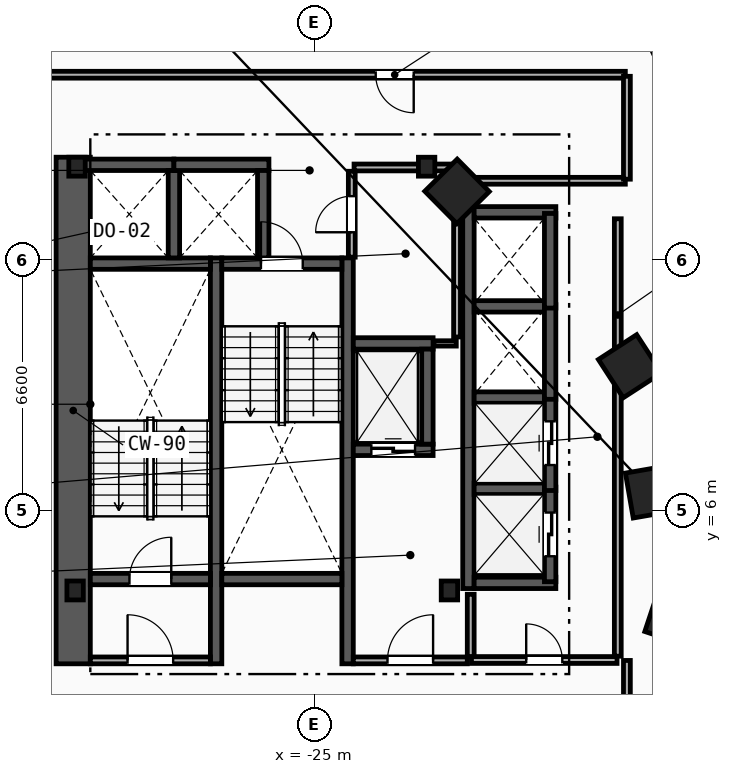
"""IFC4 building model, lengths in metres.
Left out: names, types, materials, properties, quantities, classifications, styles, units other than length and angle.
Written with IfcOpenShell. Run it as: python <this file> out.ifc"""

import sys

from ifc_helpers import new_model, si_unit, direction, frame, frame_2d, origin, origin_2d, place, context, subcontext, project, spatial, rectangle, i_section, extrude, element, fill, save


model = new_model("IFC4")
c1 = context("Model", 3, precision=1e-05, world=origin(), true_north=direction((0.0, 1.0)))
c2 = subcontext(c1, "Body", "Model", "MODEL_VIEW")
j1 = project(units=[si_unit("LENGTHUNIT", "METRE"), si_unit("PLANEANGLEUNIT", "RADIAN")], contexts=[c1])
p1 = place(None, origin())
s1 = spatial("IfcSite", under=j1, at=p1, CompositionType="ELEMENT")
p2 = place(p1, origin())
s2 = spatial("IfcBuilding", under=s1, at=p2, CompositionType="ELEMENT")
p3 = place(p2, frame((0.0, 0.0, 27.8)))
s3 = spatial("IfcBuildingStorey", under=s2, at=p3, CompositionType="ELEMENT", Elevation=27.8)
for number, where, z_axis, x_axis in (
    (1, (-31.3, 3.9, 0.0), (0.0, 0.0, 1.0), (1.0, 0.0, 0.0)),
    (2, (-21.45, 3.9, 0.0), (0.0, 0.0, 1.0), (1.0, 0.0, 0.0)),
    (3, (-22.05, 15.05, 0.0), (0.0, 0.0, 1.0), (1.0, 0.0, 0.0)),
    (4, (-31.25, 15.05, 0.0), (0.0, 0.0, 1.0), (1.0, 0.0, 0.0)),
):
    element("IfcColumn", number, at=place(p3, frame(where, z_axis=z_axis, x_axis=x_axis)), inside=s3, PredefinedType="COLUMN", context=c2, shape_type="SweptSolid", body=[
        extrude(i_section(OverallWidth=0.432, OverallDepth=0.498, WebThickness=0.056, FlangeThickness=0.089, FilletRadius=0.018, at=origin_2d()), origin(), (0.0, 0.0, 1.0), 3.8),
    ])
for number, where, z_axis, x_axis in (
    (5, (-15.55, 3.2, 0.0), (0.0, 0.0, 1.0), (0.315, 0.949, 0.0)),
    (6, (-16.125, 6.5, 0.0), (0.0, 0.0, 1.0), (-0.172, 0.985, 0.0)),
    (7, (-16.7, 9.8, 0.0), (0.0, 0.0, 1.0), (-0.544, 0.839, 0.0)),
    (8, (-21.25, 14.4, 0.0), (0.0, 0.0, 1.0), (-0.703, 0.711, 0.0)),
):
    element("IfcColumn", number, at=place(p3, frame(where, z_axis=z_axis, x_axis=x_axis)), inside=s3, PredefinedType="COLUMN", context=c2, shape_type="SweptSolid", body=[
        extrude(rectangle(XDim=1.2, YDim=1.2, at=origin_2d()), origin(), (0.0, 0.0, 1.0), 3.8),
    ])
p4 = place(p3, frame((-31.35, 1.97, 0.0), z_axis=(0.0, 0.0, 1.0), x_axis=(0.0, 1.0, 0.0)))
e9 = element("IfcWall", 9, at=p4, inside=s3, PredefinedType="SHEAR", context=c2, shape_type="SweptSolid", body=[
    extrude(rectangle(XDim=13.33, YDim=0.9, at=frame_2d((6.665, 0.0))), origin(), (0.0, 0.0, 1.0), 3.5),
])
for number, where, z_axis, x_axis in (
    (10, (-27.59, 1.97, 0.0), (0.0, 0.0, 1.0), (0.0, 1.0, 0.0)),
    (11, (-24.13, 1.97, 0.0), (0.0, 0.0, 1.0), (0.0, 1.0, 0.0)),
):
    element("IfcWall", number, at=place(p3, frame(where, z_axis=z_axis, x_axis=x_axis)), inside=s3, PredefinedType="SHEAR", context=c2, shape_type="SweptSolid", body=[
        extrude(rectangle(XDim=10.68, YDim=0.3, at=frame_2d((5.34, 0.0))), origin(), (0.0, 0.0, 1.0), 3.5),
    ])
p5 = place(p3, frame((-30.9, 4.2, 0.0), z_axis=(0.0, 0.0, 1.0), x_axis=(1.0, 0.0, 0.0)))
e12 = element("IfcWall", 12, at=p5, inside=s3, PredefinedType="SHEAR", context=c2, shape_type="SweptSolid", body=[
    extrude(rectangle(XDim=3.16, YDim=0.3, at=frame_2d((1.58, 0.0))), origin(), (0.0, 0.0, 1.0), 3.5),
])
p6 = place(p5, frame((1.03, 0.0, 0.0)))
e13 = element("IfcOpeningElement", 13, at=p6, cuts=e12, PredefinedType="OPENING", context=c2, shape_type="SweptSolid", body=[
    extrude(rectangle(XDim=1.1, YDim=2.15, at=frame_2d((0.55, 1.075))), frame((0.0, 0.16, 0.0), z_axis=(0.0, -1.0, 0.0), x_axis=(1.0, 0.0, 0.0)), (0.0, 0.0, 1.0), 0.32),
])
p7 = place(p3, frame((-30.9, 12.5, 0.0), z_axis=(0.0, 0.0, 1.0), x_axis=(1.0, 0.0, 0.0)))
e14 = element("IfcWall", 14, at=p7, inside=s3, PredefinedType="SHEAR", context=c2, shape_type="SweptSolid", body=[
    extrude(rectangle(XDim=3.16, YDim=0.3, at=frame_2d((1.58, 0.0))), origin(), (0.0, 0.0, 1.0), 3.5),
])
p8 = place(p3, frame((-27.44, 12.5, 0.0), z_axis=(0.0, 0.0, 1.0), x_axis=(1.0, 0.0, 0.0)))
e15 = element("IfcWall", 15, at=p8, inside=s3, PredefinedType="SHEAR", context=c2, shape_type="SweptSolid", body=[
    extrude(rectangle(XDim=3.16, YDim=0.3, at=frame_2d((1.58, 0.0))), origin(), (0.0, 0.0, 1.0), 3.5),
])
p9 = place(p8, frame((1.03, 0.0, 0.0)))
e16 = element("IfcOpeningElement", 16, at=p9, cuts=e15, PredefinedType="OPENING", context=c2, shape_type="SweptSolid", body=[
    extrude(rectangle(XDim=1.1, YDim=2.15, at=frame_2d((0.55, 1.075))), frame((0.0, 0.16, 0.0), z_axis=(0.0, -1.0, 0.0), x_axis=(1.0, 0.0, 0.0)), (0.0, 0.0, 1.0), 0.32),
])
p10 = place(p3, frame((-27.44, 4.2, 0.0), z_axis=(0.0, 0.0, 1.0), x_axis=(1.0, 0.0, 0.0)))
e17 = element("IfcWall", 17, at=p10, inside=s3, PredefinedType="SHEAR", context=c2, shape_type="SweptSolid", body=[
    extrude(rectangle(XDim=3.16, YDim=0.3, at=frame_2d((1.58, 0.0))), origin(), (0.0, 0.0, 1.0), 3.5),
])
p11 = place(p3, frame((-20.89, 2.15, 0.0), z_axis=(0.0, 0.0, 1.0), x_axis=(0.0, 1.0, 0.0)))
e18 = element("IfcWall", 18, at=p11, inside=s3, PredefinedType="PARTITIONING", context=c2, shape_type="SweptSolid", body=[
    extrude(rectangle(XDim=1.65, YDim=0.18, at=frame_2d((0.825, 0.0))), origin(), (0.0, 0.0, 1.0), 3.5),
])
p12 = place(p3, frame((-23.98, 2.06, 0.0), z_axis=(0.0, 0.0, 1.0), x_axis=(1.0, 0.0, 0.0)))
e19 = element("IfcWall", 19, at=p12, inside=s3, PredefinedType="PARTITIONING", context=c2, shape_type="SweptSolid", body=[
    extrude(rectangle(XDim=3.0, YDim=0.18, at=frame_2d((1.5, 0.0))), origin(), (0.0, 0.0, 1.0), 3.5),
])
p13 = place(p12, frame((0.9, 0.0, 0.0)))
e20 = element("IfcOpeningElement", 20, at=p13, cuts=e19, PredefinedType="OPENING", context=c2, shape_type="SweptSolid", body=[
    extrude(rectangle(XDim=1.2, YDim=2.15, at=frame_2d((0.6, 1.075))), frame((0.0, 0.1, 0.0), z_axis=(0.0, -1.0, 0.0), x_axis=(1.0, 0.0, 0.0)), (0.0, 0.0, 1.0), 0.2),
])
p14 = place(p3, frame((-30.9, 2.06, 0.0), z_axis=(0.0, 0.0, 1.0), x_axis=(1.0, 0.0, 0.0)))
e21 = element("IfcWall", 21, at=p14, inside=s3, PredefinedType="PARTITIONING", context=c2, shape_type="SweptSolid", body=[
    extrude(rectangle(XDim=3.16, YDim=0.18, at=frame_2d((1.58, 0.0))), origin(), (0.0, 0.0, 1.0), 3.5),
])
p15 = place(p14, frame((0.98, 0.0, 0.0)))
e22 = element("IfcOpeningElement", 22, at=p15, cuts=e21, PredefinedType="OPENING", context=c2, shape_type="SweptSolid", body=[
    extrude(rectangle(XDim=1.2, YDim=2.15, at=frame_2d((0.6, 1.075))), frame((0.0, 0.1, 0.0), z_axis=(0.0, -1.0, 0.0), x_axis=(1.0, 0.0, 0.0)), (0.0, 0.0, 1.0), 0.2),
])
p16 = place(p3, frame((-23.98, 7.6, 0.0), z_axis=(0.0, 0.0, 1.0), x_axis=(1.0, 0.0, 0.0)))
e23 = element("IfcWall", 23, at=p16, inside=s3, PredefinedType="SHEAR", context=c2, shape_type="SweptSolid", body=[
    extrude(rectangle(XDim=2.1, YDim=0.3, at=frame_2d((1.05, 0.0))), origin(), (0.0, 0.0, 1.0), 3.5),
])
p17 = place(p16, frame((0.475, 0.0, 0.0)))
e24 = element("IfcOpeningElement", 24, at=p17, cuts=e23, PredefinedType="OPENING", context=c2, shape_type="SweptSolid", body=[
    extrude(rectangle(XDim=1.15, YDim=2.2, at=frame_2d((0.575, 1.1))), frame((0.0, 0.16, 0.0), z_axis=(0.0, -1.0, 0.0), x_axis=(1.0, 0.0, 0.0)), (0.0, 0.0, 1.0), 0.32),
])
p18 = place(p3, frame((-23.98, 10.4, 0.0), z_axis=(0.0, 0.0, 1.0), x_axis=(1.0, 0.0, 0.0)))
e25 = element("IfcWall", 25, at=p18, inside=s3, PredefinedType="SHEAR", context=c2, shape_type="SweptSolid", body=[
    extrude(rectangle(XDim=2.1, YDim=0.3, at=frame_2d((1.05, 0.0))), origin(), (0.0, 0.0, 1.0), 3.5),
])
for number, where, z_axis, x_axis in (
    (26, (-22.03, 7.75, 0.0), (0.0, 0.0, 1.0), (0.0, 1.0, 0.0)),
    (27, (-31.2, 15.1, 0.0), (0.0, 0.0, 1.0), (1.0, 0.0, 0.0)),
):
    element("IfcWall", number, at=place(p3, frame(where, z_axis=z_axis, x_axis=x_axis)), inside=s3, PredefinedType="SHEAR", context=c2, shape_type="SweptSolid", body=[
        extrude(rectangle(XDim=2.5, YDim=0.3, at=frame_2d((1.25, 0.0))), origin(), (0.0, 0.0, 1.0), 3.5),
    ])
p19 = place(p3, frame((-28.7, 12.65, 0.0), z_axis=(0.0, 0.0, 1.0), x_axis=(0.0, 1.0, 0.0)))
e28 = element("IfcWall", 28, at=p19, inside=s3, PredefinedType="SHEAR", context=c2, shape_type="SweptSolid", body=[
    extrude(rectangle(XDim=2.3, YDim=0.3, at=frame_2d((1.15, 0.0))), origin(), (0.0, 0.0, 1.0), 3.5),
])
p20 = place(p3, frame((-28.7, 15.1, 0.0), z_axis=(0.0, 0.0, 1.0), x_axis=(1.0, 0.0, 0.0)))
e29 = element("IfcWall", 29, at=p20, inside=s3, PredefinedType="SHEAR", context=c2, shape_type="SweptSolid", body=[
    extrude(rectangle(XDim=2.5, YDim=0.3, at=frame_2d((1.25, 0.0))), origin(), (0.0, 0.0, 1.0), 3.5),
])
p21 = place(p3, frame((-26.35, 12.65, 0.0), z_axis=(0.0, 0.0, 1.0), x_axis=(0.0, 1.0, 0.0)))
e30 = element("IfcWall", 30, at=p21, inside=s3, PredefinedType="SHEAR", context=c2, shape_type="SweptSolid", body=[
    extrude(rectangle(XDim=2.3, YDim=0.3, at=frame_2d((1.15, 0.0))), origin(), (0.0, 0.0, 1.0), 3.5),
])
p22 = place(p3, frame((-20.95, 3.95, 0.0), z_axis=(0.0, 0.0, 1.0), x_axis=(0.0, 1.0, 0.0)))
e31 = element("IfcWall", 31, at=p22, inside=s3, PredefinedType="SHEAR", context=c2, shape_type="SweptSolid", body=[
    extrude(rectangle(XDim=10.05, YDim=0.3, at=frame_2d((5.025, 0.0))), origin(), (0.0, 0.0, 1.0), 3.5),
])
for number, where, z_axis, x_axis in (
    (32, (-20.8, 4.1, 0.0), (0.0, 0.0, 1.0), (1.0, 0.0, 0.0)),
    (33, (-20.8, 13.85, 0.0), (0.0, 0.0, 1.0), (1.0, 0.0, 0.0)),
):
    element("IfcWall", number, at=place(p3, frame(where, z_axis=z_axis, x_axis=x_axis)), inside=s3, PredefinedType="SHEAR", context=c2, shape_type="SweptSolid", body=[
        extrude(rectangle(XDim=2.15, YDim=0.3, at=frame_2d((1.075, 0.0))), origin(), (0.0, 0.0, 1.0), 3.5),
    ])
for number, where, z_axis, x_axis in (
    (34, (-20.8, 6.575, 0.0), (0.0, 0.0, 1.0), (1.0, 0.0, 0.0)),
    (35, (-20.8, 8.975, 0.0), (0.0, 0.0, 1.0), (1.0, 0.0, 0.0)),
    (36, (-20.8, 11.375, 0.0), (0.0, 0.0, 1.0), (1.0, 0.0, 0.0)),
):
    element("IfcWall", number, at=place(p3, frame(where, z_axis=z_axis, x_axis=x_axis)), inside=s3, PredefinedType="SHEAR", context=c2, shape_type="SweptSolid", body=[
        extrude(rectangle(XDim=1.85, YDim=0.3, at=frame_2d((0.925, 0.0))), origin(), (0.0, 0.0, 1.0), 3.5),
    ])
p23 = place(p3, frame((-18.8, 4.13, 0.0), z_axis=(0.0, 0.0, 1.0), x_axis=(0.0, 1.0, 0.0)))
e37 = element("IfcWall", 37, at=p23, inside=s3, PredefinedType="SHEAR", context=c2, shape_type="SweptSolid", body=[
    extrude(rectangle(XDim=2.49, YDim=0.3, at=frame_2d((1.245, 0.0))), origin(), (0.0, 0.0, 1.0), 3.5),
])
p24 = place(p23, frame((0.67, 0.0, 0.0)))
e38 = element("IfcOpeningElement", 38, at=p24, cuts=e37, PredefinedType="OPENING", context=c2, shape_type="SweptSolid", body=[
    extrude(rectangle(XDim=1.15, YDim=2.2, at=frame_2d((0.575, 1.1))), frame((0.0, 0.16, 0.0), z_axis=(0.0, -1.0, 0.0), x_axis=(1.0, 0.0, 0.0)), (0.0, 0.0, 1.0), 0.32),
])
p25 = place(p3, frame((-18.8, 6.53, 0.0), z_axis=(0.0, 0.0, 1.0), x_axis=(0.0, 1.0, 0.0)))
e39 = element("IfcWall", 39, at=p25, inside=s3, PredefinedType="SHEAR", context=c2, shape_type="SweptSolid", body=[
    extrude(rectangle(XDim=2.49, YDim=0.3, at=frame_2d((1.245, 0.0))), origin(), (0.0, 0.0, 1.0), 3.5),
])
p26 = place(p25, frame((0.67, 0.0, 0.0)))
e40 = element("IfcOpeningElement", 40, at=p26, cuts=e39, PredefinedType="OPENING", context=c2, shape_type="SweptSolid", body=[
    extrude(rectangle(XDim=1.15, YDim=2.2, at=frame_2d((0.575, 1.1))), frame((0.0, 0.16, 0.0), z_axis=(0.0, -1.0, 0.0), x_axis=(1.0, 0.0, 0.0)), (0.0, 0.0, 1.0), 0.32),
])
for number, where, z_axis, x_axis in (
    (41, (-18.8, 8.93, 0.0), (0.0, 0.0, 1.0), (0.0, 1.0, 0.0)),
    (42, (-18.8, 11.33, 0.0), (0.0, 0.0, 1.0), (0.0, 1.0, 0.0)),
):
    element("IfcWall", number, at=place(p3, frame(where, z_axis=z_axis, x_axis=x_axis)), inside=s3, PredefinedType="SHEAR", context=c2, shape_type="SweptSolid", body=[
        extrude(rectangle(XDim=2.49, YDim=0.3, at=frame_2d((1.245, 0.0))), origin(), (0.0, 0.0, 1.0), 3.5),
    ])
p27 = place(p3, frame((-17.02, 2.17, 0.0), z_axis=(0.0, 0.0, 1.0), x_axis=(0.0, 1.0, 0.0)))
e43 = element("IfcWall", 43, at=p27, inside=s3, PredefinedType="PARTITIONING", context=c2, shape_type="SweptSolid", body=[
    extrude(rectangle(XDim=11.51, YDim=0.18, at=frame_2d((5.755, 0.0))), origin(), (0.0, 0.0, 1.0), 3.5),
])
p28 = place(p3, frame((-20.87, 2.07, 0.0), z_axis=(0.0, 0.0, 1.0), x_axis=(1.0, 0.0, 0.0)))
e44 = element("IfcWall", 44, at=p28, inside=s3, PredefinedType="PARTITIONING", context=c2, shape_type="SweptSolid", body=[
    extrude(rectangle(XDim=3.83, YDim=0.18, at=frame_2d((1.915, 0.0))), origin(), (0.0, 0.0, 1.0), 3.5),
])
p29 = place(p28, frame((1.44, 0.0, 0.0)))
e45 = element("IfcOpeningElement", 45, at=p29, cuts=e44, PredefinedType="OPENING", context=c2, shape_type="SweptSolid", body=[
    extrude(rectangle(XDim=0.95, YDim=2.1, at=frame_2d((0.475, 1.05))), frame((0.0, 0.1, 0.0), z_axis=(0.0, -1.0, 0.0), x_axis=(1.0, 0.0, 0.0)), (0.0, 0.0, 1.0), 0.2),
])
p30 = place(p3, frame((-21.86, 10.4, 0.0), z_axis=(0.0, 0.0, 1.0), x_axis=(1.0, 0.0, 0.0)))
e46 = element("IfcWall", 46, at=p30, inside=s3, PredefinedType="PARTITIONING", context=c2, shape_type="SweptSolid", body=[
    extrude(rectangle(XDim=0.59, YDim=0.14, at=frame_2d((0.295, 0.0))), origin(), (0.0, 0.0, 1.0), 3.5),
])
p31 = place(p3, frame((-21.25, 10.57, 0.0), z_axis=(0.0, 0.0, 1.0), x_axis=(0.0, 1.0, 0.0)))
e47 = element("IfcWall", 47, at=p31, inside=s3, PredefinedType="PARTITIONING", context=c2, shape_type="SweptSolid", body=[
    extrude(rectangle(XDim=4.36, YDim=0.18, at=frame_2d((2.18, 0.0))), origin(), (0.0, 0.0, 1.0), 3.5),
])
p32 = place(p3, frame((-23.96, 15.03, 0.0), z_axis=(0.0, 0.0, 1.0), x_axis=(1.0, 0.0, 0.0)))
e48 = element("IfcWall", 48, at=p32, inside=s3, PredefinedType="PARTITIONING", context=c2, shape_type="SweptSolid", body=[
    extrude(rectangle(XDim=2.61, YDim=0.18, at=frame_2d((1.305, 0.0))), origin(), (0.0, 0.0, 1.0), 2.573),
])
p33 = place(p3, frame((-24.02, 12.67, 0.0), z_axis=(0.0, 0.0, 1.0), x_axis=(0.0, 1.0, 0.0)))
e49 = element("IfcWall", 49, at=p33, inside=s3, PredefinedType="PARTITIONING", context=c2, shape_type="SweptSolid", body=[
    extrude(rectangle(XDim=2.26, YDim=0.18, at=frame_2d((1.13, 0.0))), origin(), (0.0, 0.0, 1.0), 3.5),
])
p34 = place(p33, frame((0.655, 0.0, 0.0)))
e50 = element("IfcOpeningElement", 50, at=p34, cuts=e49, PredefinedType="OPENING", context=c2, shape_type="SweptSolid", body=[
    extrude(rectangle(XDim=0.95, YDim=2.1, at=frame_2d((0.475, 1.05))), frame((0.0, 0.1, 0.0), z_axis=(0.0, -1.0, 0.0), x_axis=(1.0, 0.0, 0.0)), (0.0, 0.0, 1.0), 0.2),
])
p35 = place(p3, frame((-16.822, 17.47, 0.0), z_axis=(0.0, 0.0, 1.0), x_axis=(-1.0, 0.0, 0.0)))
e51 = element("IfcWall", 51, at=p35, inside=s3, PredefinedType="PARTITIONING", context=c2, shape_type="SweptSolid", body=[
    extrude(rectangle(XDim=16.807, YDim=0.18, at=frame_2d((8.403, 0.0))), origin(), (0.0, 0.0, 1.0), 3.5),
])
p36 = place(p35, frame((5.569, 0.0, 0.0)))
e52 = element("IfcOpeningElement", 52, at=p36, cuts=e51, PredefinedType="OPENING", context=c2, shape_type="SweptSolid", body=[
    extrude(rectangle(XDim=1.0, YDim=2.15, at=frame_2d((0.5, 1.075))), frame((0.0, 0.1, 0.0), z_axis=(0.0, -1.0, 0.0), x_axis=(1.0, 0.0, 0.0)), (0.0, 0.0, 1.0), 0.2),
])
p37 = place(p3, frame((-21.178, 14.68, 0.0), z_axis=(0.0, 0.0, 1.0), x_axis=(1.0, 0.0, 0.0)))
e53 = element("IfcWall", 53, at=p37, inside=s3, PredefinedType="PARTITIONING", context=c2, shape_type="SweptSolid", body=[
    extrude(rectangle(XDim=4.357, YDim=0.18, at=frame_2d((2.178, 0.0))), origin(), (0.0, 0.0, 1.0), 3.5),
])
p38 = place(p3, frame((-16.78, 14.721, 0.0), z_axis=(0.0, 0.0, 1.0), x_axis=(0.0, 1.0, 0.0)))
e54 = element("IfcWall", 54, at=p38, inside=s3, PredefinedType="PARTITIONING", context=c2, shape_type="SweptSolid", body=[
    extrude(rectangle(XDim=2.707, YDim=0.18, at=frame_2d((1.354, 0.0))), origin(), (0.0, 0.0, 1.0), 3.5),
])
p39 = place(p3, frame((-16.78, -0.329, 0.0), z_axis=(0.0, 0.0, 1.0), x_axis=(0.0, 1.0, 0.0)))
e55 = element("IfcWall", 55, at=p39, inside=s3, PredefinedType="PARTITIONING", context=c2, shape_type="SweptSolid", body=[
    extrude(rectangle(XDim=2.387, YDim=0.18, at=frame_2d((1.194, 0.0))), origin(), (0.0, 0.0, 1.0), 3.5),
])
p40 = place(p6, origin())
e56 = element("IfcDoor", 56, at=p40, inside=s3, OperationType="SINGLE_SWING_RIGHT", PredefinedType="DOOR", context=c2, shape_type="SweptSolid", body=[
    extrude(rectangle(XDim=1.1, YDim=2.15, at=frame_2d((0.55, 1.075))), frame((0.0, 0.025, 0.0), z_axis=(0.0, -1.0, 0.0), x_axis=(1.0, 0.0, 0.0)), (0.0, 0.0, 1.0), 0.05),
])
fill(e13, e56)
p41 = place(p9, origin())
e57 = element("IfcDoor", 57, at=p41, inside=s3, OperationType="SINGLE_SWING_LEFT", PredefinedType="DOOR", context=c2, shape_type="SweptSolid", body=[
    extrude(rectangle(XDim=1.1, YDim=2.15, at=frame_2d((0.55, 1.075))), frame((0.0, 0.025, 0.0), z_axis=(0.0, -1.0, 0.0), x_axis=(1.0, 0.0, 0.0)), (0.0, 0.0, 1.0), 0.05),
])
fill(e16, e57)
p42 = place(p13, origin())
e58 = element("IfcDoor", 58, at=p42, inside=s3, OperationType="SINGLE_SWING_RIGHT", PredefinedType="DOOR", context=c2, shape_type="SweptSolid", body=[
    extrude(rectangle(XDim=1.2, YDim=2.15, at=frame_2d((0.6, 1.075))), frame((0.0, 0.025, 0.0), z_axis=(0.0, -1.0, 0.0), x_axis=(1.0, 0.0, 0.0)), (0.0, 0.0, 1.0), 0.05),
])
fill(e20, e58)
p43 = place(p15, origin())
e59 = element("IfcDoor", 59, at=p43, inside=s3, OperationType="SINGLE_SWING_LEFT", PredefinedType="DOOR", context=c2, shape_type="SweptSolid", body=[
    extrude(rectangle(XDim=1.2, YDim=2.15, at=frame_2d((0.6, 1.075))), frame((0.0, 0.025, 0.0), z_axis=(0.0, -1.0, 0.0), x_axis=(1.0, 0.0, 0.0)), (0.0, 0.0, 1.0), 0.05),
])
fill(e22, e59)
p44 = place(p17, origin())
e60 = element("IfcDoor", 60, at=p44, inside=s3, OperationType="SLIDING_TO_LEFT", PredefinedType="TRAPDOOR", context=c2, shape_type="SweptSolid", body=[
    extrude(rectangle(XDim=1.15, YDim=2.2, at=frame_2d((0.575, 1.1))), frame((0.0, 0.025, 0.0), z_axis=(0.0, -1.0, 0.0), x_axis=(1.0, 0.0, 0.0)), (0.0, 0.0, 1.0), 0.05),
])
fill(e24, e60)
p45 = place(p24, origin())
e61 = element("IfcDoor", 61, at=p45, inside=s3, OperationType="SLIDING_TO_LEFT", PredefinedType="TRAPDOOR", context=c2, shape_type="SweptSolid", body=[
    extrude(rectangle(XDim=1.15, YDim=2.2, at=frame_2d((0.575, 1.1))), frame((0.0, 0.025, 0.0), z_axis=(0.0, -1.0, 0.0), x_axis=(1.0, 0.0, 0.0)), (0.0, 0.0, 1.0), 0.05),
])
fill(e38, e61)
p46 = place(p26, origin())
e62 = element("IfcDoor", 62, at=p46, inside=s3, OperationType="SLIDING_TO_LEFT", PredefinedType="TRAPDOOR", context=c2, shape_type="SweptSolid", body=[
    extrude(rectangle(XDim=1.15, YDim=2.2, at=frame_2d((0.575, 1.1))), frame((0.0, 0.025, 0.0), z_axis=(0.0, -1.0, 0.0), x_axis=(1.0, 0.0, 0.0)), (0.0, 0.0, 1.0), 0.05),
])
fill(e40, e62)
p47 = place(p36, origin())
e63 = element("IfcDoor", 63, at=p47, inside=s3, OperationType="SINGLE_SWING_LEFT", PredefinedType="DOOR", context=c2, shape_type="SweptSolid", body=[
    extrude(rectangle(XDim=1.0, YDim=2.15, at=frame_2d((0.5, 1.075))), frame((0.0, 0.025, 0.0), z_axis=(0.0, -1.0, 0.0), x_axis=(1.0, 0.0, 0.0)), (0.0, 0.0, 1.0), 0.05),
])
fill(e52, e63)
p48 = place(p29, origin())
e64 = element("IfcDoor", 64, at=p48, inside=s3, OperationType="SINGLE_SWING_LEFT", PredefinedType="DOOR", context=c2, shape_type="SweptSolid", body=[
    extrude(rectangle(XDim=0.95, YDim=2.1, at=frame_2d((0.475, 1.05))), frame((0.0, 0.025, 0.0), z_axis=(0.0, -1.0, 0.0), x_axis=(1.0, 0.0, 0.0)), (0.0, 0.0, 1.0), 0.05),
])
fill(e45, e64)
p49 = place(p34, origin())
e65 = element("IfcDoor", 65, at=p49, inside=s3, OperationType="SINGLE_SWING_LEFT", PredefinedType="DOOR", context=c2, shape_type="SweptSolid", body=[
    extrude(rectangle(XDim=0.95, YDim=2.1, at=frame_2d((0.475, 1.05))), frame((0.0, 0.025, 0.0), z_axis=(0.0, -1.0, 0.0), x_axis=(1.0, 0.0, 0.0)), (0.0, 0.0, 1.0), 0.05),
])
fill(e50, e65)
save(model, sys.argv[1])
